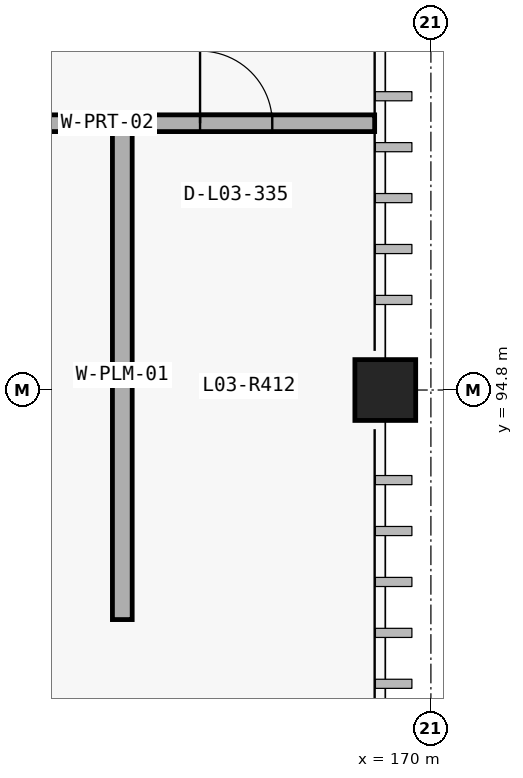
"""IFC4 building model, lengths in metres.
Left out: names, types, materials, properties, quantities, classifications, styles, units other than length and angle.
Written with IfcOpenShell. Run it as: python <this file> out.ifc"""

import sys

from ifc_helpers import new_model, si_unit, direction, frame, frame_2d, origin_with_axes, origin_2d_with_axis, place, context, subcontext, project, spatial, rectangle, circle, extrude, element, fill, save


model = new_model("IFC4")
c1 = context("Model", 3, precision=1e-05, world=origin_with_axes(), true_north=direction((0.0, 1.0)))
c2 = subcontext(c1, "Body", "Model", "MODEL_VIEW")
j1 = project(units=[si_unit("LENGTHUNIT", "METRE"), si_unit("PLANEANGLEUNIT", "RADIAN")], contexts=[c1])
p1 = place(None, origin_with_axes())
s1 = spatial("IfcSite", under=j1, at=p1, CompositionType="ELEMENT")
p2 = place(p1, origin_with_axes())
s2 = spatial("IfcBuilding", under=s1, at=p2, CompositionType="ELEMENT")
p3 = place(p2, frame((0.0, 0.0, 15.6), z_axis=(0.0, 0.0, 1.0), x_axis=(1.0, 0.0, 0.0)))
s3 = spatial("IfcBuildingStorey", under=s2, at=p3, CompositionType="ELEMENT", Elevation=15.6)
p4 = place(None, frame((162.22, 98.31, 15.6), z_axis=(0.0, 0.0, 1.0), x_axis=(1.0, 0.0, 0.0)))
e1 = element("IfcWall", 1, at=p4, inside=s3, PredefinedType="PARTITIONING", context=c2, shape_type="SweptSolid", body=[
    extrude(rectangle(XDim=7.04, YDim=0.22, at=frame_2d((3.52, 0.0), x_axis=(1.0, 0.0))), origin_with_axes(), (0.0, 0.0, 1.0), 4.48),
])
p5 = place(None, frame((164.242, 98.31, 15.6), z_axis=(0.0, 0.0, 1.0), x_axis=(1.0, 0.0, 0.0)))
e2 = element("IfcOpeningElement", 2, at=p5, cuts=e1, PredefinedType="OPENING", context=c2, shape_type="SweptSolid", body=[
    extrude(rectangle(XDim=0.94, YDim=2.3, at=frame_2d((0.0, 1.15), x_axis=(1.0, 0.0))), frame((0.0, 0.12, 0.0), z_axis=(0.0, -1.0, 0.0), x_axis=(1.0, 0.0, 0.0)), (0.0, 0.0, 1.0), 0.24),
])
p6 = place(None, frame((167.438, 98.31, 15.6), z_axis=(0.0, 0.0, 1.0), x_axis=(1.0, 0.0, 0.0)))
e3 = element("IfcOpeningElement", 3, at=p6, cuts=e1, PredefinedType="OPENING", context=c2, shape_type="SweptSolid", body=[
    extrude(rectangle(XDim=0.95, YDim=2.1, at=frame_2d((0.0, 1.05), x_axis=(1.0, 0.0))), frame((0.0, 0.12, 0.0), z_axis=(0.0, -1.0, 0.0), x_axis=(1.0, 0.0, 0.0)), (0.0, 0.0, 1.0), 0.24),
])
p7 = place(None, frame((165.94, 91.78, 15.6), z_axis=(0.0, 0.0, 1.0), x_axis=(0.0, 1.0, 0.0)))
e4 = element("IfcWall", 4, at=p7, inside=s3, PredefinedType="PLUMBINGWALL", context=c2, shape_type="SweptSolid", body=[
    extrude(rectangle(XDim=6.43, YDim=0.26, at=frame_2d((3.215, 0.0), x_axis=(1.0, 0.0))), origin_with_axes(), (0.0, 0.0, 1.0), 4.48),
])
p8 = place(None, frame((169.4, 94.8, 15.6), z_axis=(0.0, 0.0, 1.0), x_axis=(1.0, 0.0, 0.0)))
e5 = element("IfcColumn", 5, at=p8, inside=s3, PredefinedType="COLUMN", context=c2, shape_type="SweptSolid", body=[
    extrude(circle(Radius=0.4, at=origin_2d_with_axis()), origin_with_axes(), (0.0, 0.0, 1.0), 4.8),
])
p9 = place(None, frame((167.438, 98.31, 15.6), z_axis=(0.0, 0.0, 1.0), x_axis=(1.0, 0.0, 0.0)))
e6 = element("IfcDoor", 6, at=p9, inside=s3, OperationType="SINGLE_SWING_LEFT", PredefinedType="DOOR", context=c2, shape_type="SweptSolid", body=[
    extrude(rectangle(XDim=0.95, YDim=2.1, at=frame_2d((0.0, 1.05), x_axis=(1.0, 0.0))), frame((0.0, 0.04, 0.0), z_axis=(0.0, -1.0, 0.0), x_axis=(1.0, 0.0, 0.0)), (0.0, 0.0, 1.0), 0.08),
])
fill(e3, e6)
save(model, sys.argv[1])
